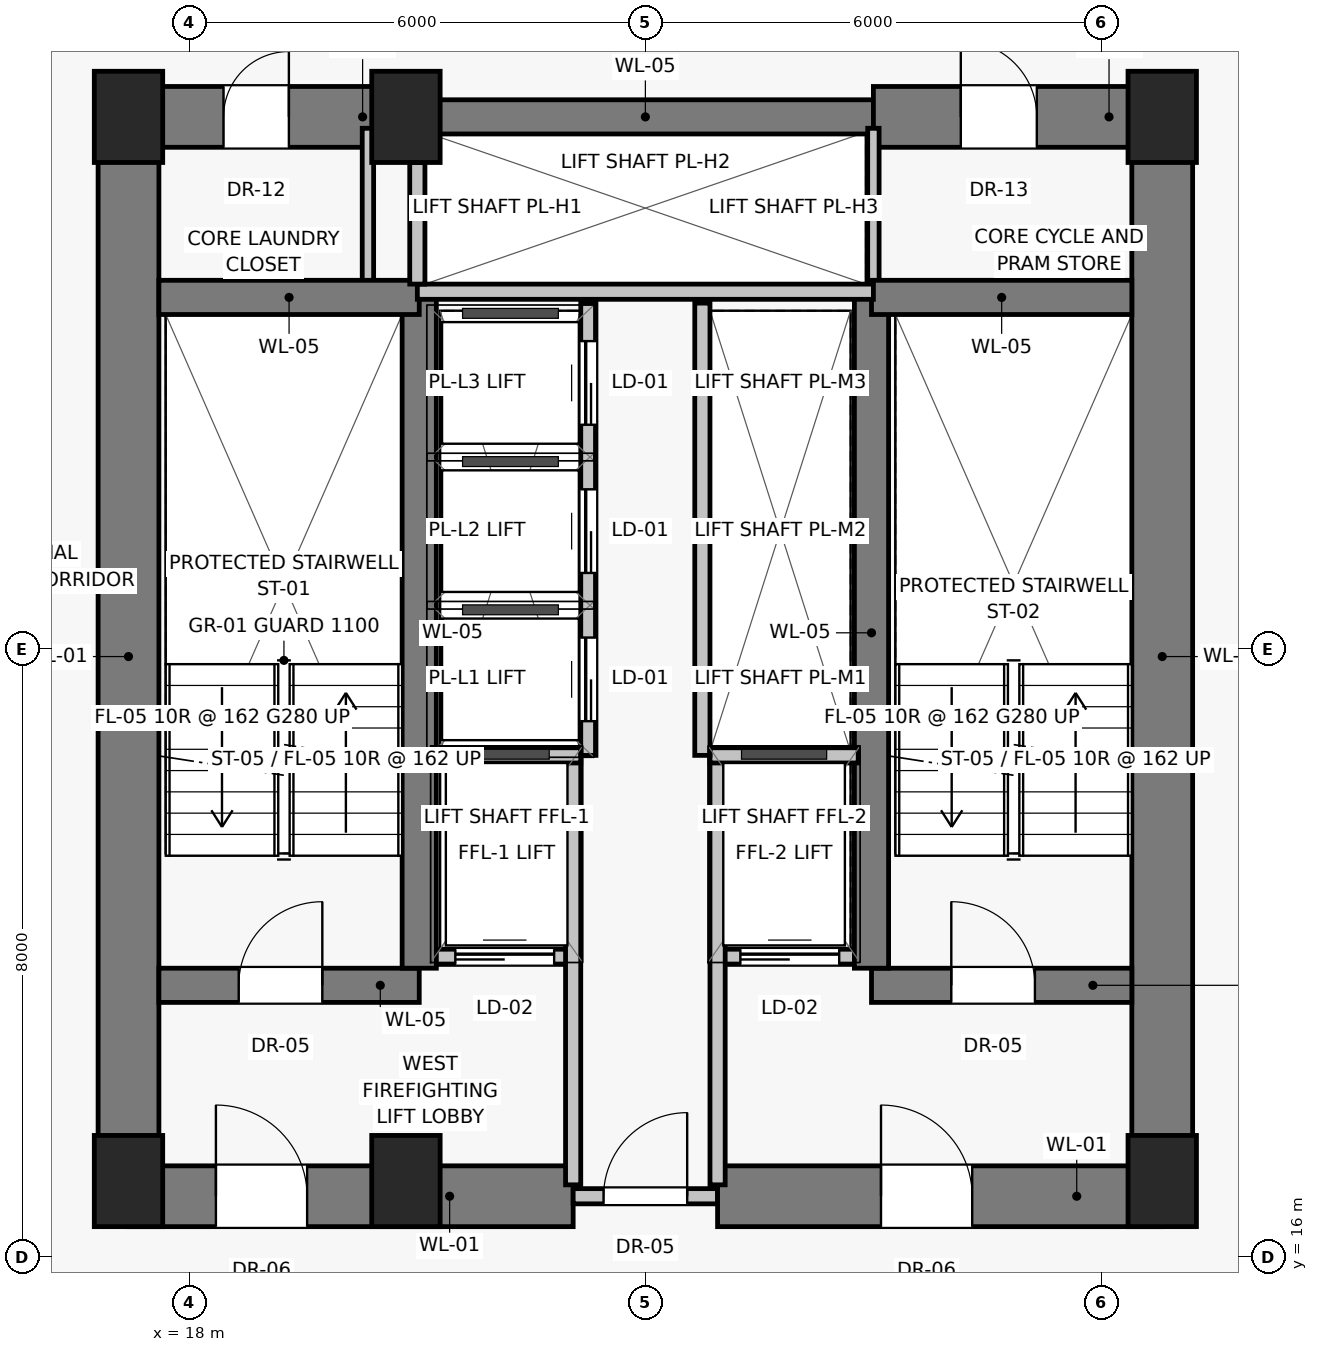
"""IFC4 building model, lengths in metres.
Left out: names, types, materials, properties, quantities, classifications, styles, units other than length and angle.
Written with IfcOpenShell. Run it as: python <this file> out.ifc"""

import sys

from ifc_helpers import new_model, si_unit, direction, frame, frame_2d, origin, origin_2d, place, context, subcontext, project, spatial, rectangle, extrude, source, transform, mapped, element, fill, save


model = new_model("IFC4")
c1 = context("Model", 3, precision=1e-05, world=origin(), true_north=direction((0.0, 1.0)))
c2 = subcontext(c1, "Body", "Model", "MODEL_VIEW")
j1 = project(units=[si_unit("LENGTHUNIT", "METRE"), si_unit("PLANEANGLEUNIT", "RADIAN")], contexts=[c1])
p1 = place(None, origin())
s1 = spatial("IfcSite", under=j1, at=p1, CompositionType="ELEMENT")
p2 = place(p1, origin())
s2 = spatial("IfcBuilding", under=s1, at=p2, CompositionType="ELEMENT")
p3 = place(p2, frame((0.0, 0.0, 46.8)))
s3 = spatial("IfcBuildingStorey", under=s2, at=p3, CompositionType="ELEMENT", Elevation=46.8)
for number, where, z_axis, x_axis in (
    (1, (17.2, 17.0, 0.0), (0.0, 0.0, 1.0), (1.0, 0.0, 0.0)),
    (2, (20.85, 17.0, 0.0), (0.0, 0.0, 1.0), (1.0, 0.0, 0.0)),
    (3, (30.8, 17.0, 0.0), (0.0, 0.0, 1.0), (1.0, 0.0, 0.0)),
    (4, (17.2, 31.0, 0.0), (0.0, 0.0, 1.0), (1.0, 0.0, 0.0)),
    (5, (20.85, 31.0, 0.0), (0.0, 0.0, 1.0), (1.0, 0.0, 0.0)),
    (6, (30.8, 31.0, 0.0), (0.0, 0.0, 1.0), (1.0, 0.0, 0.0)),
):
    element("IfcColumn", number, at=place(p3, frame(where, z_axis=z_axis, x_axis=x_axis)), inside=s3, PredefinedType="PILASTER", context=c2, shape_type="SweptSolid", body=[
        extrude(rectangle(XDim=0.9, YDim=1.2, at=origin_2d()), origin(), (0.0, 0.0, 1.0), 3.25),
    ])
for number, where, z_axis, x_axis in (
    (7, (17.2, 16.8, 0.0), (0.0, 0.0, 1.0), (0.0, 1.0, 0.0)),
    (8, (30.8, 16.8, 0.0), (0.0, 0.0, 1.0), (0.0, 1.0, 0.0)),
):
    element("IfcWall", number, at=place(p3, frame(where, z_axis=z_axis, x_axis=x_axis)), inside=s3, PredefinedType="SHEAR", context=c2, shape_type="SweptSolid", body=[
        extrude(rectangle(XDim=14.2, YDim=0.8, at=frame_2d((7.1, 0.0))), origin(), (0.0, 0.0, 1.0), 3.0),
    ])
p4 = place(p3, frame((17.2, 16.8, 0.0), z_axis=(0.0, 0.0, 1.0), x_axis=(1.0, 0.0, 0.0)))
e9 = element("IfcWall", 9, at=p4, inside=s3, PredefinedType="SHEAR", context=c2, shape_type="SweptSolid", body=[
    extrude(rectangle(XDim=5.85, YDim=0.8, at=frame_2d((2.925, 0.0))), origin(), (0.0, 0.0, 1.0), 3.0),
])
p5 = place(p4, frame((1.15, 0.0, 0.0)))
e10 = element("IfcOpeningElement", 10, at=p5, cuts=e9, PredefinedType="OPENING", context=c2, shape_type="SweptSolid", body=[
    extrude(rectangle(XDim=1.2, YDim=2.03, at=frame_2d((0.6, 1.015))), frame((0.0, 0.41, 0.0), z_axis=(0.0, -1.0, 0.0), x_axis=(1.0, 0.0, 0.0)), (0.0, 0.0, 1.0), 0.82),
])
p6 = place(p3, frame((23.05, 16.8, 0.0), z_axis=(0.0, 0.0, 1.0), x_axis=(1.0, 0.0, 0.0)))
e11 = element("IfcWall", 11, at=p6, inside=s3, PredefinedType="SOLIDWALL", context=c2, shape_type="SweptSolid", body=[
    extrude(rectangle(XDim=1.9, YDim=0.2, at=frame_2d((0.95, 0.0))), origin(), (0.0, 0.0, 1.0), 2.15),
])
p7 = place(p6, frame((0.4, 0.0, 0.0)))
e12 = element("IfcOpeningElement", 12, at=p7, cuts=e11, PredefinedType="OPENING", context=c2, shape_type="SweptSolid", body=[
    extrude(rectangle(XDim=1.1, YDim=2.03, at=frame_2d((0.55, 1.015))), frame((0.0, 0.11, 0.0), z_axis=(0.0, -1.0, 0.0), x_axis=(1.0, 0.0, 0.0)), (0.0, 0.0, 1.0), 0.22),
])
p8 = place(p3, frame((24.95, 16.8, 0.0), z_axis=(0.0, 0.0, 1.0), x_axis=(1.0, 0.0, 0.0)))
e13 = element("IfcWall", 13, at=p8, inside=s3, PredefinedType="SHEAR", context=c2, shape_type="SweptSolid", body=[
    extrude(rectangle(XDim=5.85, YDim=0.8, at=frame_2d((2.925, 0.0))), origin(), (0.0, 0.0, 1.0), 3.0),
])
p9 = place(p8, frame((2.15, 0.0, 0.0)))
e14 = element("IfcOpeningElement", 14, at=p9, cuts=e13, PredefinedType="OPENING", context=c2, shape_type="SweptSolid", body=[
    extrude(rectangle(XDim=1.2, YDim=2.03, at=frame_2d((0.6, 1.015))), frame((0.0, 0.41, 0.0), z_axis=(0.0, -1.0, 0.0), x_axis=(1.0, 0.0, 0.0)), (0.0, 0.0, 1.0), 0.82),
])
p10 = place(p3, frame((17.2, 31.0, 0.0), z_axis=(0.0, 0.0, 1.0), x_axis=(1.0, 0.0, 0.0)))
e15 = element("IfcWall", 15, at=p10, inside=s3, PredefinedType="SHEAR", context=c2, shape_type="SweptSolid", body=[
    extrude(rectangle(XDim=3.8, YDim=0.8, at=frame_2d((1.9, 0.0))), origin(), (0.0, 0.0, 1.0), 3.0),
])
p11 = place(p10, frame((1.25, 0.0, 0.0)))
e16 = element("IfcOpeningElement", 16, at=p11, cuts=e15, PredefinedType="OPENING", context=c2, shape_type="SweptSolid", body=[
    extrude(rectangle(XDim=0.86, YDim=2.01, at=frame_2d((0.43, 1.005))), frame((0.0, 0.41, 0.0), z_axis=(0.0, -1.0, 0.0), x_axis=(1.0, 0.0, 0.0)), (0.0, 0.0, 1.0), 0.82),
])
p12 = place(p3, frame((21.0, 31.0, 0.0), z_axis=(0.0, 0.0, 1.0), x_axis=(1.0, 0.0, 0.0)))
e17 = element("IfcWall", 17, at=p12, inside=s3, PredefinedType="SHEAR", context=c2, shape_type="SweptSolid", body=[
    extrude(rectangle(XDim=6.0, YDim=0.45, at=frame_2d((3.0, 0.0))), origin(), (0.0, 0.0, 1.0), 3.0),
])
p13 = place(p3, frame((27.0, 31.0, 0.0), z_axis=(0.0, 0.0, 1.0), x_axis=(1.0, 0.0, 0.0)))
e18 = element("IfcWall", 18, at=p13, inside=s3, PredefinedType="SHEAR", context=c2, shape_type="SweptSolid", body=[
    extrude(rectangle(XDim=3.8, YDim=0.8, at=frame_2d((1.9, 0.0))), origin(), (0.0, 0.0, 1.0), 3.0),
])
p14 = place(p13, frame((1.15, 0.0, 0.0)))
e19 = element("IfcOpeningElement", 19, at=p14, cuts=e18, PredefinedType="OPENING", context=c2, shape_type="SweptSolid", body=[
    extrude(rectangle(XDim=1.0, YDim=2.01, at=frame_2d((0.5, 1.005))), frame((0.0, 0.41, 0.0), z_axis=(0.0, -1.0, 0.0), x_axis=(1.0, 0.0, 0.0)), (0.0, 0.0, 1.0), 0.82),
])
for number, where, z_axis, x_axis in (
    (20, (20.35, 28.65, 0.0), (0.0, 0.0, 1.0), (0.0, 1.0, 0.0)),
    (21, (27.0, 28.65, 0.0), (0.0, 0.0, 1.0), (0.0, 1.0, 0.0)),
):
    element("IfcWall", number, at=place(p3, frame(where, z_axis=z_axis, x_axis=x_axis)), inside=s3, PredefinedType="PARTITIONING", context=c2, shape_type="SweptSolid", body=[
        extrude(rectangle(XDim=2.2, YDim=0.15, at=frame_2d((1.1, 0.0))), origin(), (0.0, 0.0, 1.0), 3.0),
    ])
p15 = place(p3, frame((17.6, 19.575, 0.0), z_axis=(0.0, 0.0, 1.0), x_axis=(1.0, 0.0, 0.0)))
e22 = element("IfcWall", 22, at=p15, inside=s3, PredefinedType="SHEAR", context=c2, shape_type="SweptSolid", body=[
    extrude(rectangle(XDim=3.425, YDim=0.45, at=frame_2d((1.712, 0.0))), origin(), (0.0, 0.0, 1.0), 3.0),
])
p16 = place(p15, frame((1.05, 0.0, 0.0)))
e23 = element("IfcOpeningElement", 23, at=p16, cuts=e22, PredefinedType="OPENING", context=c2, shape_type="SweptSolid", body=[
    extrude(rectangle(XDim=1.1, YDim=2.03, at=frame_2d((0.55, 1.015))), frame((0.0, 0.235, 0.0), z_axis=(0.0, -1.0, 0.0), x_axis=(1.0, 0.0, 0.0)), (0.0, 0.0, 1.0), 0.47),
])
p17 = place(p3, frame((21.2, 19.95, 0.0), z_axis=(0.0, 0.0, 1.0), x_axis=(1.0, 0.0, 0.0)))
e24 = element("IfcWall", 24, at=p17, inside=s3, PredefinedType="SOLIDWALL", context=c2, shape_type="SweptSolid", body=[
    extrude(rectangle(XDim=1.85, YDim=0.2, at=frame_2d((0.925, 0.0))), origin(), (0.0, 0.0, 1.0), 3.0),
])
p18 = place(p17, frame((0.3, 0.0, 0.0)))
e25 = element("IfcOpeningElement", 25, at=p18, cuts=e24, PredefinedType="OPENING", context=c2, shape_type="SweptSolid", body=[
    extrude(rectangle(XDim=1.3, YDim=2.25, at=frame_2d((0.65, 1.125))), frame((0.0, 0.11, 0.0), z_axis=(0.0, -1.0, 0.0), x_axis=(1.0, 0.0, 0.0)), (0.0, 0.0, 1.0), 0.22),
])
p19 = place(p3, frame((24.95, 19.95, 0.0), z_axis=(0.0, 0.0, 1.0), x_axis=(1.0, 0.0, 0.0)))
e26 = element("IfcWall", 26, at=p19, inside=s3, PredefinedType="SOLIDWALL", context=c2, shape_type="SweptSolid", body=[
    extrude(rectangle(XDim=1.85, YDim=0.2, at=frame_2d((0.925, 0.0))), origin(), (0.0, 0.0, 1.0), 3.0),
])
p20 = place(p19, frame((0.3, 0.0, 0.0)))
e27 = element("IfcOpeningElement", 27, at=p20, cuts=e26, PredefinedType="OPENING", context=c2, shape_type="SweptSolid", body=[
    extrude(rectangle(XDim=1.3, YDim=2.25, at=frame_2d((0.65, 1.125))), frame((0.0, 0.11, 0.0), z_axis=(0.0, -1.0, 0.0), x_axis=(1.0, 0.0, 0.0)), (0.0, 0.0, 1.0), 0.22),
])
p21 = place(p3, frame((26.975, 19.575, 0.0), z_axis=(0.0, 0.0, 1.0), x_axis=(1.0, 0.0, 0.0)))
e28 = element("IfcWall", 28, at=p21, inside=s3, PredefinedType="SHEAR", context=c2, shape_type="SweptSolid", body=[
    extrude(rectangle(XDim=3.425, YDim=0.45, at=frame_2d((1.712, 0.0))), origin(), (0.0, 0.0, 1.0), 3.0),
])
p22 = place(p21, frame((1.05, 0.0, 0.0)))
e29 = element("IfcOpeningElement", 29, at=p22, cuts=e28, PredefinedType="OPENING", context=c2, shape_type="SweptSolid", body=[
    extrude(rectangle(XDim=1.1, YDim=2.03, at=frame_2d((0.55, 1.015))), frame((0.0, 0.235, 0.0), z_axis=(0.0, -1.0, 0.0), x_axis=(1.0, 0.0, 0.0)), (0.0, 0.0, 1.0), 0.47),
])
for number, where, z_axis, x_axis in (
    (30, (21.025, 19.8, 0.0), (0.0, 0.0, 1.0), (0.0, 1.0, 0.0)),
    (31, (26.975, 19.8, 0.0), (0.0, 0.0, 1.0), (0.0, 1.0, 0.0)),
):
    element("IfcWall", number, at=place(p3, frame(where, z_axis=z_axis, x_axis=x_axis)), inside=s3, PredefinedType="SHEAR", context=c2, shape_type="SweptSolid", body=[
        extrude(rectangle(XDim=8.825, YDim=0.45, at=frame_2d((4.413, 0.0))), origin(), (0.0, 0.0, 1.0), 3.0),
    ])
for number, where, z_axis, x_axis in (
    (32, (17.6, 28.625, 0.0), (0.0, 0.0, 1.0), (1.0, 0.0, 0.0)),
    (33, (26.975, 28.625, 0.0), (0.0, 0.0, 1.0), (1.0, 0.0, 0.0)),
):
    element("IfcWall", number, at=place(p3, frame(where, z_axis=z_axis, x_axis=x_axis)), inside=s3, PredefinedType="SHEAR", context=c2, shape_type="SweptSolid", body=[
        extrude(rectangle(XDim=3.425, YDim=0.45, at=frame_2d((1.712, 0.0))), origin(), (0.0, 0.0, 1.0), 3.0),
    ])
for number, where, z_axis, x_axis in (
    (34, (23.05, 16.95, 0.0), (0.0, 0.0, 1.0), (0.0, 1.0, 0.0)),
    (35, (24.95, 16.95, 0.0), (0.0, 0.0, 1.0), (0.0, 1.0, 0.0)),
):
    element("IfcWall", number, at=place(p3, frame(where, z_axis=z_axis, x_axis=x_axis)), inside=s3, PredefinedType="SOLIDWALL", context=c2, shape_type="SweptSolid", body=[
        extrude(rectangle(XDim=5.6, YDim=0.2, at=frame_2d((2.8, 0.0))), origin(), (0.0, 0.0, 1.0), 3.0),
    ])
for number, where, z_axis, x_axis in (
    (36, (21.2, 22.6, 0.0), (0.0, 0.0, 1.0), (1.0, 0.0, 0.0)),
    (37, (24.85, 22.6, 0.0), (0.0, 0.0, 1.0), (1.0, 0.0, 0.0)),
):
    element("IfcWall", number, at=place(p3, frame(where, z_axis=z_axis, x_axis=x_axis)), inside=s3, PredefinedType="SOLIDWALL", context=c2, shape_type="SweptSolid", body=[
        extrude(rectangle(XDim=1.95, YDim=0.2, at=frame_2d((0.975, 0.0))), origin(), (0.0, 0.0, 1.0), 3.0),
    ])
p23 = place(p3, frame((21.0, 28.7, 0.0), z_axis=(0.0, 0.0, 1.0), x_axis=(1.0, 0.0, 0.0)))
e38 = element("IfcWall", 38, at=p23, inside=s3, PredefinedType="SOLIDWALL", context=c2, shape_type="SweptSolid", body=[
    extrude(rectangle(XDim=6.0, YDim=0.2, at=frame_2d((3.0, 0.0))), origin(), (0.0, 0.0, 1.0), 3.0),
])
p24 = place(p3, frame((21.0, 28.8, 0.0), z_axis=(0.0, 0.0, 1.0), x_axis=(0.0, 1.0, 0.0)))
e39 = element("IfcWall", 39, at=p24, inside=s3, PredefinedType="SOLIDWALL", context=c2, shape_type="SweptSolid", body=[
    extrude(rectangle(XDim=1.6, YDim=0.2, at=frame_2d((0.8, 0.0))), origin(), (0.0, 0.0, 1.0), 3.0),
])
p25 = place(p3, frame((23.25, 22.6, 0.0), z_axis=(0.0, 0.0, 1.0), x_axis=(0.0, 1.0, 0.0)))
e40 = element("IfcWall", 40, at=p25, inside=s3, PredefinedType="SOLIDWALL", context=c2, shape_type="SweptSolid", body=[
    extrude(rectangle(XDim=5.95, YDim=0.2, at=frame_2d((2.975, 0.0))), origin(), (0.0, 0.0, 1.0), 3.0),
])
p26 = place(p25, frame((0.45, 0.0, 0.0)))
e41 = element("IfcOpeningElement", 41, at=p26, cuts=e40, PredefinedType="OPENING", context=c2, shape_type="SweptSolid", body=[
    extrude(rectangle(XDim=1.1, YDim=2.08, at=frame_2d((0.55, 1.04))), frame((0.0, 0.11, 0.0), z_axis=(0.0, -1.0, 0.0), x_axis=(1.0, 0.0, 0.0)), (0.0, 0.0, 1.0), 0.22),
])
p27 = place(p25, frame((2.4, 0.0, 0.0)))
e42 = element("IfcOpeningElement", 42, at=p27, cuts=e40, PredefinedType="OPENING", context=c2, shape_type="SweptSolid", body=[
    extrude(rectangle(XDim=1.1, YDim=2.08, at=frame_2d((0.55, 1.04))), frame((0.0, 0.11, 0.0), z_axis=(0.0, -1.0, 0.0), x_axis=(1.0, 0.0, 0.0)), (0.0, 0.0, 1.0), 0.22),
])
p28 = place(p25, frame((4.35, 0.0, 0.0)))
e43 = element("IfcOpeningElement", 43, at=p28, cuts=e40, PredefinedType="OPENING", context=c2, shape_type="SweptSolid", body=[
    extrude(rectangle(XDim=1.1, YDim=2.08, at=frame_2d((0.55, 1.04))), frame((0.0, 0.11, 0.0), z_axis=(0.0, -1.0, 0.0), x_axis=(1.0, 0.0, 0.0)), (0.0, 0.0, 1.0), 0.22),
])
p29 = place(p3, frame((24.75, 22.6, 0.0), z_axis=(0.0, 0.0, 1.0), x_axis=(0.0, 1.0, 0.0)))
e44 = element("IfcWall", 44, at=p29, inside=s3, PredefinedType="SOLIDWALL", context=c2, shape_type="SweptSolid", body=[
    extrude(rectangle(XDim=5.95, YDim=0.2, at=frame_2d((2.975, 0.0))), origin(), (0.0, 0.0, 1.0), 3.0),
])
m1 = source(origin(), c2, "Body", "SweptSolid", [
    extrude(rectangle(XDim=1.2, YDim=2.03, at=frame_2d((0.6, 1.015))), frame((0.0, 0.025, 0.0), z_axis=(0.0, -1.0, 0.0), x_axis=(1.0, 0.0, 0.0)), (0.0, 0.0, 1.0), 0.05),
])
p30 = place(p5, origin())
e45 = element("IfcDoor", 45, at=p30, inside=s3, OperationType="SINGLE_SWING_LEFT", PredefinedType="DOOR", context=c2, shape_type="MappedRepresentation", body=[
    mapped(m1, transform((0.0, 0.0, 0.0), scale=1.0)),
])
fill(e10, e45)
m2 = source(origin(), c2, "Body", "SweptSolid", [
    extrude(rectangle(XDim=1.1, YDim=2.03, at=frame_2d((0.55, 1.015))), frame((0.0, 0.025, 0.0), z_axis=(0.0, -1.0, 0.0), x_axis=(1.0, 0.0, 0.0)), (0.0, 0.0, 1.0), 0.05),
])
p31 = place(p7, origin())
e46 = element("IfcDoor", 46, at=p31, inside=s3, OperationType="SINGLE_SWING_RIGHT", PredefinedType="DOOR", context=c2, shape_type="MappedRepresentation", body=[
    mapped(m2, transform((0.0, 0.0, 0.0), scale=1.0)),
])
fill(e12, e46)
p32 = place(p9, origin())
e47 = element("IfcDoor", 47, at=p32, inside=s3, OperationType="SINGLE_SWING_LEFT", PredefinedType="DOOR", context=c2, shape_type="MappedRepresentation", body=[
    mapped(m1, transform((0.0, 0.0, 0.0), scale=1.0)),
])
fill(e14, e47)
m3 = source(origin(), c2, "Body", "SweptSolid", [
    extrude(rectangle(XDim=0.86, YDim=2.01, at=frame_2d((0.43, 1.005))), frame((0.0, 0.025, 0.0), z_axis=(0.0, -1.0, 0.0), x_axis=(1.0, 0.0, 0.0)), (0.0, 0.0, 1.0), 0.05),
])
p33 = place(p11, origin())
e48 = element("IfcDoor", 48, at=p33, inside=s3, OperationType="SINGLE_SWING_RIGHT", PredefinedType="DOOR", context=c2, shape_type="MappedRepresentation", body=[
    mapped(m3, transform((0.0, 0.0, 0.0), scale=1.0)),
])
fill(e16, e48)
m4 = source(origin(), c2, "Body", "SweptSolid", [
    extrude(rectangle(XDim=1.0, YDim=2.01, at=frame_2d((0.5, 1.005))), frame((0.0, 0.025, 0.0), z_axis=(0.0, -1.0, 0.0), x_axis=(1.0, 0.0, 0.0)), (0.0, 0.0, 1.0), 0.05),
])
p34 = place(p14, origin())
e49 = element("IfcDoor", 49, at=p34, inside=s3, OperationType="SINGLE_SWING_LEFT", PredefinedType="DOOR", context=c2, shape_type="MappedRepresentation", body=[
    mapped(m4, transform((0.0, 0.0, 0.0), scale=1.0)),
])
fill(e19, e49)
p35 = place(p16, origin())
e50 = element("IfcDoor", 50, at=p35, inside=s3, OperationType="SINGLE_SWING_RIGHT", PredefinedType="DOOR", context=c2, shape_type="MappedRepresentation", body=[
    mapped(m2, transform((0.0, 0.0, 0.0), scale=1.0)),
])
fill(e23, e50)
m5 = source(origin(), c2, "Body", "SweptSolid", [
    extrude(rectangle(XDim=1.3, YDim=2.25, at=frame_2d((0.65, 1.125))), frame((0.0, 0.025, 0.0), z_axis=(0.0, -1.0, 0.0), x_axis=(1.0, 0.0, 0.0)), (0.0, 0.0, 1.0), 0.05),
])
p36 = place(p18, origin())
e51 = element("IfcDoor", 51, at=p36, inside=s3, OperationType="SLIDING_TO_LEFT", PredefinedType="DOOR", context=c2, shape_type="MappedRepresentation", body=[
    mapped(m5, transform((0.0, 0.0, 0.0), scale=1.0)),
])
fill(e25, e51)
p37 = place(p20, origin())
e52 = element("IfcDoor", 52, at=p37, inside=s3, OperationType="SLIDING_TO_LEFT", PredefinedType="DOOR", context=c2, shape_type="MappedRepresentation", body=[
    mapped(m5, transform((0.0, 0.0, 0.0), scale=1.0)),
])
fill(e27, e52)
p38 = place(p22, origin())
e53 = element("IfcDoor", 53, at=p38, inside=s3, OperationType="SINGLE_SWING_LEFT", PredefinedType="DOOR", context=c2, shape_type="MappedRepresentation", body=[
    mapped(m2, transform((0.0, 0.0, 0.0), scale=1.0)),
])
fill(e29, e53)
m6 = source(origin(), c2, "Body", "SweptSolid", [
    extrude(rectangle(XDim=1.1, YDim=2.08, at=frame_2d((0.55, 1.04))), frame((0.0, 0.025, 0.0), z_axis=(0.0, -1.0, 0.0), x_axis=(1.0, 0.0, 0.0)), (0.0, 0.0, 1.0), 0.05),
])
p39 = place(p26, origin())
e54 = element("IfcDoor", 54, at=p39, inside=s3, OperationType="SLIDING_TO_LEFT", PredefinedType="DOOR", context=c2, shape_type="MappedRepresentation", body=[
    mapped(m6, transform((0.0, 0.0, 0.0), scale=1.0)),
])
fill(e41, e54)
p40 = place(p27, origin())
e55 = element("IfcDoor", 55, at=p40, inside=s3, OperationType="SLIDING_TO_LEFT", PredefinedType="DOOR", context=c2, shape_type="MappedRepresentation", body=[
    mapped(m6, transform((0.0, 0.0, 0.0), scale=1.0)),
])
fill(e42, e55)
p41 = place(p28, origin())
e56 = element("IfcDoor", 56, at=p41, inside=s3, OperationType="SLIDING_TO_LEFT", PredefinedType="DOOR", context=c2, shape_type="MappedRepresentation", body=[
    mapped(m6, transform((0.0, 0.0, 0.0), scale=1.0)),
])
fill(e43, e56)
save(model, sys.argv[1])
